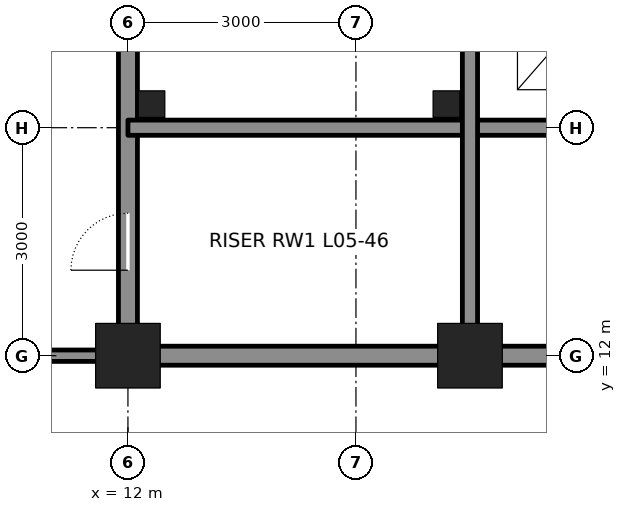
"""IFC4 building model, lengths in metres.
Left out: names, types, materials, properties, quantities, classifications, styles, units other than length and angle.
Written with IfcOpenShell. Run it as: python <this file> out.ifc"""

import sys

from ifc_helpers import new_model, si_unit, direction, frame, frame_2d, origin, origin_2d, place, context, subcontext, project, spatial, rectangle, hollow_rectangle, extrude, element, fill, save


model = new_model("IFC4")
c1 = context("Model", 3, precision=1e-05, world=origin(), true_north=direction((0.0, 1.0)))
c2 = subcontext(c1, "Body", "Model", "MODEL_VIEW")
j1 = project(units=[si_unit("LENGTHUNIT", "METRE"), si_unit("PLANEANGLEUNIT", "RADIAN")], contexts=[c1])
p1 = place(None, origin())
s1 = spatial("IfcSite", under=j1, at=p1, CompositionType="ELEMENT")
p2 = place(p1, origin())
s2 = spatial("IfcBuilding", under=s1, at=p2, CompositionType="ELEMENT")
p3 = place(p2, frame((0.0, 0.0, 28.8)))
s3 = spatial("IfcBuildingStorey", under=s2, at=p3, CompositionType="ELEMENT", Elevation=28.8)
for number, where, z_axis, x_axis in (
    (1, (12.0, 12.0, 0.0), (0.0, 0.0, 1.0), (1.0, 0.0, 0.0)),
    (2, (16.5, 12.0, 0.0), (0.0, 0.0, 1.0), (1.0, 0.0, 0.0)),
):
    element("IfcColumn", number, at=place(p3, frame(where, z_axis=z_axis, x_axis=x_axis)), inside=s3, PredefinedType="COLUMN", context=c2, shape_type="SweptSolid", body=[
        extrude(hollow_rectangle(XDim=0.85, YDim=0.85, WallThickness=0.085, at=origin_2d()), origin(), (0.0, 0.0, 1.0), 4.5),
    ])
p4 = place(p3, frame((12.0, 12.25, 0.0), z_axis=(0.0, 0.0, 1.0), x_axis=(0.0, 1.0, 0.0)))
e3 = element("IfcWall", 3, at=p4, inside=s3, PredefinedType="SOLIDWALL", context=c2, shape_type="SweptSolid", body=[
    extrude(rectangle(XDim=8.5, YDim=0.25, at=frame_2d((4.25, 0.0))), origin(), (0.0, 0.0, 1.0), 3.113),
])
p5 = place(p4, frame((0.875, 0.0, 0.0)))
e4 = element("IfcOpeningElement", 4, at=p5, cuts=e3, PredefinedType="OPENING", context=c2, shape_type="SweptSolid", body=[
    extrude(rectangle(XDim=0.75, YDim=2.1, at=frame_2d((0.375, 1.05))), frame((0.0, 0.135, 0.0), z_axis=(0.0, -1.0, 0.0), x_axis=(1.0, 0.0, 0.0)), (0.0, 0.0, 1.0), 0.27),
])
p6 = place(p3, frame((12.25, 12.0, 0.0), z_axis=(0.0, 0.0, 1.0), x_axis=(1.0, 0.0, 0.0)))
e5 = element("IfcWall", 5, at=p6, inside=s3, PredefinedType="SOLIDWALL", context=c2, shape_type="SweptSolid", body=[
    extrude(rectangle(XDim=4.0, YDim=0.25, at=frame_2d((2.0, 0.0))), origin(), (0.0, 0.0, 1.0), 3.181),
])
p7 = place(p3, frame((16.75, 12.0, 0.0), z_axis=(0.0, 0.0, 1.0), x_axis=(1.0, 0.0, 0.0)))
e6 = element("IfcWall", 6, at=p7, inside=s3, PredefinedType="SOLIDWALL", context=c2, shape_type="SweptSolid", body=[
    extrude(rectangle(XDim=2.5, YDim=0.25, at=frame_2d((1.25, 0.0))), origin(), (0.0, 0.0, 1.0), 3.181),
])
p8 = place(p3, frame((12.0, 15.0, 0.0), z_axis=(0.0, 0.0, 1.0), x_axis=(1.0, 0.0, 0.0)))
e7 = element("IfcWall", 7, at=p8, inside=s3, PredefinedType="SOLIDWALL", context=c2, shape_type="SweptSolid", body=[
    extrude(rectangle(XDim=7.5, YDim=0.2, at=frame_2d((3.75, 0.0))), origin(), (0.0, 0.0, 1.0), 4.34),
])
p9 = place(p3, frame((16.5, 12.25, 0.0), z_axis=(0.0, 0.0, 1.0), x_axis=(0.0, 1.0, 0.0)))
e8 = element("IfcWall", 8, at=p9, inside=s3, PredefinedType="SOLIDWALL", context=c2, shape_type="SweptSolid", body=[
    extrude(rectangle(XDim=8.5, YDim=0.2, at=frame_2d((4.25, 0.0))), origin(), (0.0, 0.0, 1.0), 3.413),
])
p10 = place(p3, frame((10.2, 12.0, -0.3), z_axis=(0.0, 0.0, 1.0), x_axis=(1.0, 0.0, 0.0)))
e9 = element("IfcWall", 9, at=p10, inside=s3, PredefinedType="PARTITIONING", context=c2, shape_type="SweptSolid", body=[
    extrude(rectangle(XDim=1.8, YDim=0.15, at=frame_2d((0.9, 0.0))), origin(), (0.0, 0.0, 1.0), 3.481),
])
for number, where, z_axis, x_axis in (
    (10, (12.31, 15.31, 0.0), (0.0, 0.0, 1.0), (1.0, 0.0, 0.0)),
    (11, (16.19, 15.31, 0.0), (0.0, 0.0, 1.0), (1.0, 0.0, 0.0)),
):
    element("IfcColumn", number, at=place(p3, frame(where, z_axis=z_axis, x_axis=x_axis)), inside=s3, PredefinedType="COLUMN", context=c2, shape_type="SweptSolid", body=[
        extrude(hollow_rectangle(XDim=0.35, YDim=0.35, WallThickness=0.035, at=origin_2d()), origin(), (0.0, 0.0, 1.0), 4.5),
    ])
p11 = place(p5, origin())
e12 = element("IfcDoor", 12, at=p11, inside=s3, OperationType="SINGLE_SWING_LEFT", PredefinedType="DOOR", context=c2, shape_type="SweptSolid", body=[
    extrude(rectangle(XDim=0.75, YDim=2.1, at=frame_2d((0.375, 1.05))), frame((0.0, 0.025, 0.0), z_axis=(0.0, -1.0, 0.0), x_axis=(1.0, 0.0, 0.0)), (0.0, 0.0, 1.0), 0.05),
])
fill(e4, e12)
save(model, sys.argv[1])
